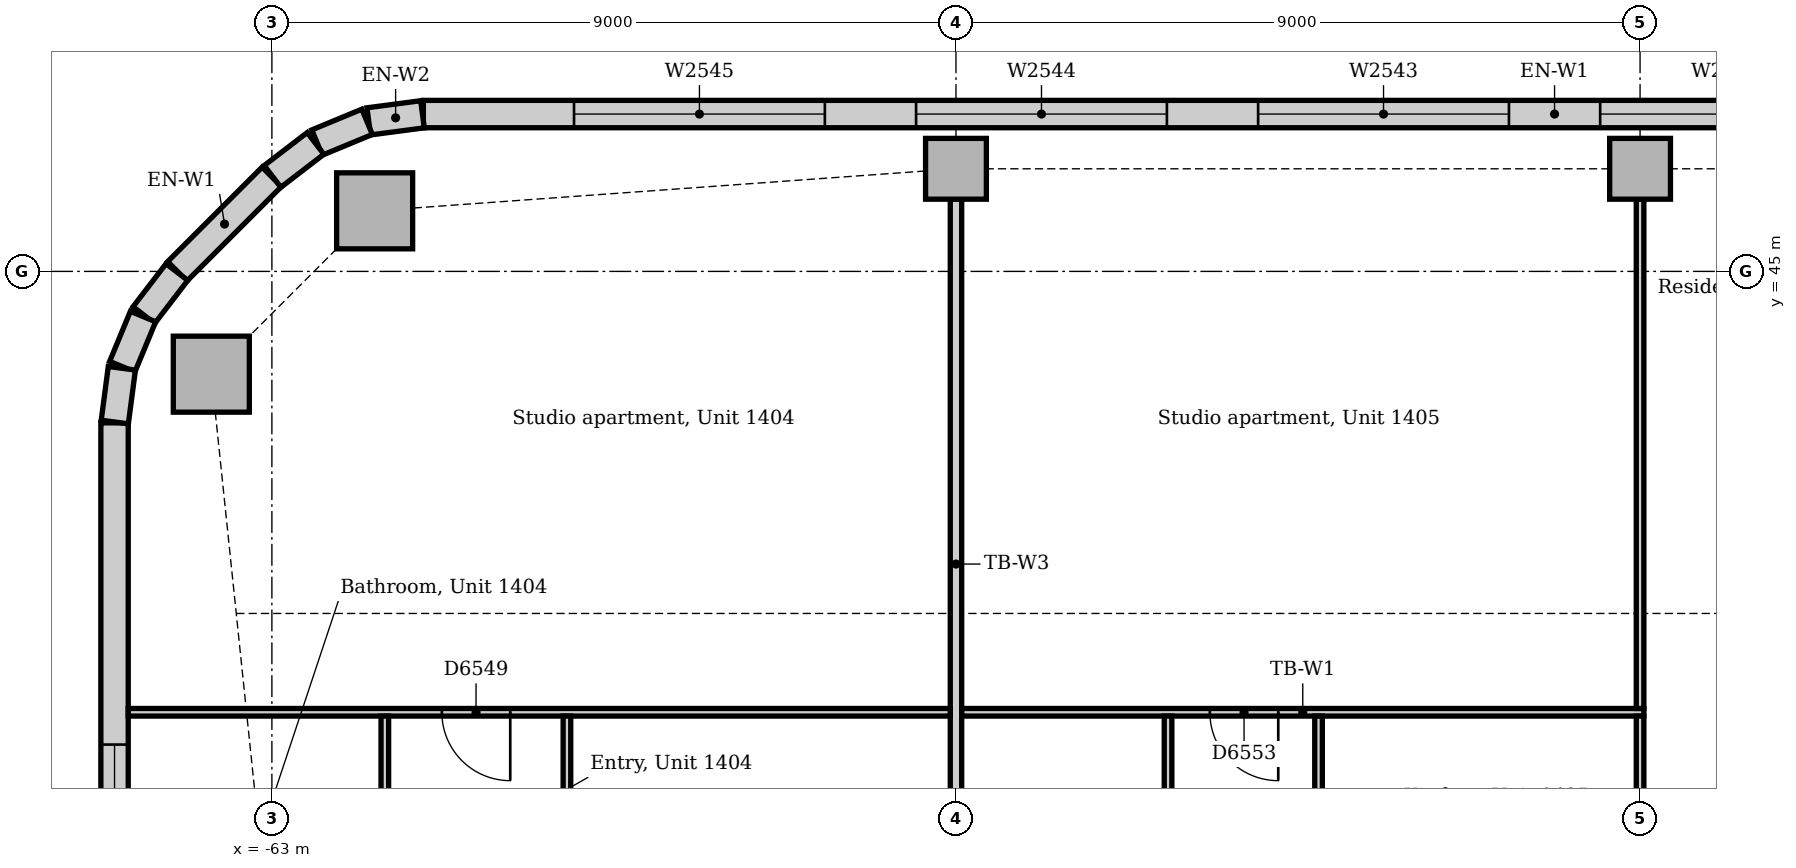
"""IFC4 building model, lengths in metres.
Left out: names, types, materials, properties, quantities, classifications, styles, units other than length and angle.
Written with IfcOpenShell. Run it as: python <this file> out.ifc"""

import sys

from ifc_helpers import new_model, si_unit, direction, frame, frame_2d, origin, origin_2d, place, context, subcontext, project, spatial, rectangle, extrude, element, fill, save


model = new_model("IFC4")
c1 = context("Model", 3, precision=1e-05, world=origin(), true_north=direction((0.0, 1.0)))
c2 = subcontext(c1, "Body", "Model", "MODEL_VIEW")
j1 = project(units=[si_unit("LENGTHUNIT", "METRE"), si_unit("PLANEANGLEUNIT", "RADIAN")], contexts=[c1])
p1 = place(None, origin())
s1 = spatial("IfcSite", under=j1, at=p1, CompositionType="ELEMENT")
p2 = place(p1, origin())
s2 = spatial("IfcBuilding", under=s1, at=p2, CompositionType="ELEMENT")
p3 = place(p2, frame((0.0, 0.0, 63.0)))
s3 = spatial("IfcBuildingStorey", under=s2, at=p3, CompositionType="ELEMENT", Elevation=63.0)
for number, where, z_axis, x_axis in (
    (1, (-61.648, 45.797, 0.0), (0.0, 0.0, 1.0), (1.0, 0.0, 0.0)),
    (2, (-63.797, 43.648, 0.0), (0.0, 0.0, 1.0), (1.0, 0.0, 0.0)),
):
    element("IfcColumn", number, at=place(p3, frame(where, z_axis=z_axis, x_axis=x_axis)), inside=s3, PredefinedType="COLUMN", context=c2, shape_type="SweptSolid", body=[
        extrude(rectangle(XDim=1.0, YDim=1.0, at=origin_2d()), origin(), (0.0, 0.0, 1.0), 3.85),
    ])
for number, where, z_axis, x_axis in (
    (3, (-54.0, 46.35, 0.0), (0.0, 0.0, 1.0), (1.0, 0.0, 0.0)),
    (4, (-45.0, 46.35, 0.0), (0.0, 0.0, 1.0), (1.0, 0.0, 0.0)),
):
    element("IfcColumn", number, at=place(p3, frame(where, z_axis=z_axis, x_axis=x_axis)), inside=s3, PredefinedType="COLUMN", context=c2, shape_type="SweptSolid", body=[
        extrude(rectangle(XDim=0.8, YDim=0.8, at=origin_2d()), origin(), (0.0, 0.0, 1.0), 3.85),
    ])
p4 = place(p3, frame((-31.243, 47.07, 0.0), z_axis=(0.0, 0.0, 1.0), x_axis=(-1.0, 0.0, 0.0)))
e5 = element("IfcWall", 5, at=p4, inside=s3, PredefinedType="STANDARD", context=c2, shape_type="SweptSolid", body=[
    extrude(rectangle(XDim=29.765, YDim=0.36, at=frame_2d((14.882, 0.0))), origin(), (0.0, 0.0, 1.0), 3.85),
])
p5 = place(p4, frame((1.982, 0.0, 0.9)))
e6 = element("IfcOpeningElement", 6, at=p5, cuts=e5, PredefinedType="OPENING", context=c2, shape_type="SweptSolid", body=[
    extrude(rectangle(XDim=3.3, YDim=1.6, at=frame_2d((1.65, 0.8))), frame((0.0, 0.19, 0.0), z_axis=(0.0, -1.0, 0.0), x_axis=(1.0, 0.0, 0.0)), (0.0, 0.0, 1.0), 0.38),
])
p6 = place(p4, frame((6.482, 0.0, 0.9)))
e7 = element("IfcOpeningElement", 7, at=p6, cuts=e5, PredefinedType="OPENING", context=c2, shape_type="SweptSolid", body=[
    extrude(rectangle(XDim=3.3, YDim=1.6, at=frame_2d((1.65, 0.8))), frame((0.0, 0.19, 0.0), z_axis=(0.0, -1.0, 0.0), x_axis=(1.0, 0.0, 0.0)), (0.0, 0.0, 1.0), 0.38),
])
p7 = place(p4, frame((10.982, 0.0, 0.9)))
e8 = element("IfcOpeningElement", 8, at=p7, cuts=e5, PredefinedType="OPENING", context=c2, shape_type="SweptSolid", body=[
    extrude(rectangle(XDim=3.3, YDim=1.6, at=frame_2d((1.65, 0.8))), frame((0.0, 0.19, 0.0), z_axis=(0.0, -1.0, 0.0), x_axis=(1.0, 0.0, 0.0)), (0.0, 0.0, 1.0), 0.38),
])
p8 = place(p4, frame((15.482, 0.0, 0.9)))
e9 = element("IfcOpeningElement", 9, at=p8, cuts=e5, PredefinedType="OPENING", context=c2, shape_type="SweptSolid", body=[
    extrude(rectangle(XDim=3.3, YDim=1.6, at=frame_2d((1.65, 0.8))), frame((0.0, 0.19, 0.0), z_axis=(0.0, -1.0, 0.0), x_axis=(1.0, 0.0, 0.0)), (0.0, 0.0, 1.0), 0.38),
])
p9 = place(p4, frame((19.982, 0.0, 0.9)))
e10 = element("IfcOpeningElement", 10, at=p9, cuts=e5, PredefinedType="OPENING", context=c2, shape_type="SweptSolid", body=[
    extrude(rectangle(XDim=3.3, YDim=1.6, at=frame_2d((1.65, 0.8))), frame((0.0, 0.19, 0.0), z_axis=(0.0, -1.0, 0.0), x_axis=(1.0, 0.0, 0.0)), (0.0, 0.0, 1.0), 0.38),
])
p10 = place(p4, frame((24.482, 0.0, 0.9)))
e11 = element("IfcOpeningElement", 11, at=p10, cuts=e5, PredefinedType="OPENING", context=c2, shape_type="SweptSolid", body=[
    extrude(rectangle(XDim=3.3, YDim=1.6, at=frame_2d((1.65, 0.8))), frame((0.0, 0.19, 0.0), z_axis=(0.0, -1.0, 0.0), x_axis=(1.0, 0.0, 0.0)), (0.0, 0.0, 1.0), 0.38),
])
p11 = place(p3, frame((-63.001, 46.244, 0.0), z_axis=(0.0, 0.0, 1.0), x_axis=(-0.707106781187, -0.707106781187, 0.0)))
e12 = element("IfcWall", 12, at=p11, inside=s3, PredefinedType="STANDARD", context=c2, shape_type="SweptSolid", body=[
    extrude(rectangle(XDim=1.757, YDim=0.36, at=frame_2d((0.879, 0.0))), origin(), (0.0, 0.0, 1.0), 3.85),
])
p12 = place(p3, frame((-65.07, 43.007, 0.0), z_axis=(0.0, 0.0, 1.0), x_axis=(0.0, -1.0, 0.0)))
e13 = element("IfcWall", 13, at=p12, inside=s3, PredefinedType="STANDARD", context=c2, shape_type="SweptSolid", body=[
    extrude(rectangle(XDim=23.765, YDim=0.36, at=frame_2d((11.882, 0.0))), origin(), (0.0, 0.0, 1.0), 3.85),
])
p13 = place(p12, frame((4.232, 0.0, 0.9)))
e14 = element("IfcOpeningElement", 14, at=p13, cuts=e13, PredefinedType="OPENING", context=c2, shape_type="SweptSolid", body=[
    extrude(rectangle(XDim=1.8, YDim=1.6, at=frame_2d((0.9, 0.8))), frame((0.0, 0.19, 0.0), z_axis=(0.0, -1.0, 0.0), x_axis=(1.0, 0.0, 0.0)), (0.0, 0.0, 1.0), 0.38),
])
p14 = place(p12, frame((9.332, 0.0, 0.9)))
e15 = element("IfcOpeningElement", 15, at=p14, cuts=e13, PredefinedType="OPENING", context=c2, shape_type="SweptSolid", body=[
    extrude(rectangle(XDim=1.8, YDim=1.6, at=frame_2d((0.9, 0.8))), frame((0.0, 0.19, 0.0), z_axis=(0.0, -1.0, 0.0), x_axis=(1.0, 0.0, 0.0)), (0.0, 0.0, 1.0), 0.38),
])
p15 = place(p12, frame((12.482, 0.0, 0.9)))
e16 = element("IfcOpeningElement", 16, at=p15, cuts=e13, PredefinedType="OPENING", context=c2, shape_type="SweptSolid", body=[
    extrude(rectangle(XDim=3.3, YDim=1.6, at=frame_2d((1.65, 0.8))), frame((0.0, 0.19, 0.0), z_axis=(0.0, -1.0, 0.0), x_axis=(1.0, 0.0, 0.0)), (0.0, 0.0, 1.0), 0.38),
])
p16 = place(p12, frame((16.982, 0.0, 0.9)))
e17 = element("IfcOpeningElement", 17, at=p16, cuts=e13, PredefinedType="OPENING", context=c2, shape_type="SweptSolid", body=[
    extrude(rectangle(XDim=3.3, YDim=1.6, at=frame_2d((1.65, 0.8))), frame((0.0, 0.19, 0.0), z_axis=(0.0, -1.0, 0.0), x_axis=(1.0, 0.0, 0.0)), (0.0, 0.0, 1.0), 0.38),
])
for number, where, z_axis, x_axis in (
    (18, (-61.019, 47.067, 0.0), (0.0, 0.0, 1.0), (-0.991, -0.131, 0.0)),
    (19, (-61.747, 46.968, 0.0), (0.0, 0.0, 1.0), (-0.924, -0.383, 0.0)),
):
    element("IfcWall", number, at=place(p3, frame(where, z_axis=z_axis, x_axis=x_axis)), inside=s3, PredefinedType="STANDARD", context=c2, shape_type="SweptSolid", body=[
        extrude(rectangle(XDim=0.713, YDim=0.36, at=frame_2d((0.356, 0.0))), origin(), (0.0, 0.0, 1.0), 3.85),
    ])
for number, where, z_axis, x_axis in (
    (20, (-62.425, 46.684, 0.0), (0.0, 0.0, 1.0), (-0.793, -0.609, 0.0)),
    (21, (-64.25, 44.991, 0.0), (0.0, 0.0, 1.0), (-0.609, -0.793, 0.0)),
):
    element("IfcWall", number, at=place(p3, frame(where, z_axis=z_axis, x_axis=x_axis)), inside=s3, PredefinedType="STANDARD", context=c2, shape_type="SweptSolid", body=[
        extrude(rectangle(XDim=0.713, YDim=0.36, at=frame_2d((0.357, 0.0))), origin(), (0.0, 0.0, 1.0), 3.85),
    ])
for number, where, z_axis, x_axis in (
    (22, (-64.695, 44.406, 0.0), (0.0, 0.0, 1.0), (-0.383, -0.924, 0.0)),
    (23, (-64.974, 43.726, 0.0), (0.0, 0.0, 1.0), (-0.131, -0.991, 0.0)),
):
    element("IfcWall", number, at=place(p3, frame(where, z_axis=z_axis, x_axis=x_axis)), inside=s3, PredefinedType="STANDARD", context=c2, shape_type="SweptSolid", body=[
        extrude(rectangle(XDim=0.713, YDim=0.36, at=frame_2d((0.356, 0.0))), origin(), (0.0, 0.0, 1.0), 3.85),
    ])
p17 = place(p3, frame((-54.0, 36.35, 0.0), z_axis=(0.0, 0.0, 1.0), x_axis=(0.0, 1.0, 0.0)))
e24 = element("IfcWall", 24, at=p17, inside=s3, PredefinedType="PARTITIONING", context=c2, shape_type="SweptSolid", body=[
    extrude(rectangle(XDim=9.6, YDim=0.15, at=frame_2d((4.8, 0.0))), origin(), (0.0, 0.0, 1.0), 3.256),
])
p18 = place(p3, frame((-53.925, 39.2, 0.0), z_axis=(0.0, 0.0, 1.0), x_axis=(1.0, 0.0, 0.0)))
e25 = element("IfcWall", 25, at=p18, inside=s3, PredefinedType="PARTITIONING", context=c2, shape_type="SweptSolid", body=[
    extrude(rectangle(XDim=8.975, YDim=0.1, at=frame_2d((4.487, 0.0))), origin(), (0.0, 0.0, 1.0), 3.85),
])
p19 = place(p18, frame((3.265, 0.0, 0.0)))
e26 = element("IfcOpeningElement", 26, at=p19, cuts=e25, PredefinedType="OPENING", context=c2, shape_type="SweptSolid", body=[
    extrude(rectangle(XDim=0.9, YDim=2.1, at=frame_2d((0.45, 1.05))), frame((0.0, 0.06, 0.0), z_axis=(0.0, -1.0, 0.0), x_axis=(1.0, 0.0, 0.0)), (0.0, 0.0, 1.0), 0.12),
])
p20 = place(p3, frame((-64.89, 39.2, 0.0), z_axis=(0.0, 0.0, 1.0), x_axis=(1.0, 0.0, 0.0)))
e27 = element("IfcWall", 27, at=p20, inside=s3, PredefinedType="PARTITIONING", context=c2, shape_type="SweptSolid", body=[
    extrude(rectangle(XDim=10.815, YDim=0.1, at=frame_2d((5.407, 0.0))), origin(), (0.0, 0.0, 1.0), 3.85),
])
p21 = place(p20, frame((4.126, 0.0, 0.0)))
e28 = element("IfcOpeningElement", 28, at=p21, cuts=e27, PredefinedType="OPENING", context=c2, shape_type="SweptSolid", body=[
    extrude(rectangle(XDim=0.9, YDim=2.1, at=frame_2d((0.45, 1.05))), frame((0.0, 0.06, 0.0), z_axis=(0.0, -1.0, 0.0), x_axis=(1.0, 0.0, 0.0)), (0.0, 0.0, 1.0), 0.12),
])
p22 = place(p3, frame((-45.0, 39.25, 0.0), z_axis=(0.0, 0.0, 1.0), x_axis=(0.0, 1.0, 0.0)))
e29 = element("IfcWall", 29, at=p22, inside=s3, PredefinedType="PARTITIONING", context=c2, shape_type="SweptSolid", body=[
    extrude(rectangle(XDim=6.7, YDim=0.1, at=frame_2d((3.35, 0.0))), origin(), (0.0, 0.0, 1.0), 3.256),
])
p23 = place(p3, frame((-45.0, 36.35, 0.0), z_axis=(0.0, 0.0, 1.0), x_axis=(0.0, 1.0, 0.0)))
e30 = element("IfcWall", 30, at=p23, inside=s3, PredefinedType="PARTITIONING", context=c2, shape_type="SweptSolid", body=[
    extrude(rectangle(XDim=2.8, YDim=0.1, at=frame_2d((1.4, 0.0))), origin(), (0.0, 0.0, 1.0), 3.256),
])
p24 = place(p3, frame((-61.514, 36.075, 0.0), z_axis=(0.0, 0.0, 1.0), x_axis=(0.0, 1.0, 0.0)))
e31 = element("IfcWall", 31, at=p24, inside=s3, PredefinedType="PARTITIONING", context=c2, shape_type="SweptSolid", body=[
    extrude(rectangle(XDim=3.075, YDim=0.1, at=frame_2d((1.538, 0.0))), origin(), (0.0, 0.0, 1.0), 3.85),
])
p25 = place(p24, frame((1.1, 0.0, 0.0)))
e32 = element("IfcOpeningElement", 32, at=p25, cuts=e31, PredefinedType="OPENING", context=c2, shape_type="SweptSolid", body=[
    extrude(rectangle(XDim=0.9, YDim=2.1, at=frame_2d((0.45, 1.05))), frame((0.0, 0.06, 0.0), z_axis=(0.0, -1.0, 0.0), x_axis=(1.0, 0.0, 0.0)), (0.0, 0.0, 1.0), 0.12),
])
p26 = place(p3, frame((-59.118, 36.075, 0.0), z_axis=(0.0, 0.0, 1.0), x_axis=(0.0, 1.0, 0.0)))
e33 = element("IfcWall", 33, at=p26, inside=s3, PredefinedType="PARTITIONING", context=c2, shape_type="SweptSolid", body=[
    extrude(rectangle(XDim=3.075, YDim=0.1, at=frame_2d((1.538, 0.0))), origin(), (0.0, 0.0, 1.0), 3.85),
])
p27 = place(p26, frame((1.1, 0.0, 0.0)))
e34 = element("IfcOpeningElement", 34, at=p27, cuts=e33, PredefinedType="OPENING", context=c2, shape_type="SweptSolid", body=[
    extrude(rectangle(XDim=0.9, YDim=2.1, at=frame_2d((0.45, 1.05))), frame((0.0, 0.06, 0.0), z_axis=(0.0, -1.0, 0.0), x_axis=(1.0, 0.0, 0.0)), (0.0, 0.0, 1.0), 0.12),
])
p28 = place(p3, frame((-51.21, 36.075, 0.0), z_axis=(0.0, 0.0, 1.0), x_axis=(0.0, 1.0, 0.0)))
e35 = element("IfcWall", 35, at=p28, inside=s3, PredefinedType="PARTITIONING", context=c2, shape_type="SweptSolid", body=[
    extrude(rectangle(XDim=3.075, YDim=0.1, at=frame_2d((1.538, 0.0))), origin(), (0.0, 0.0, 1.0), 3.85),
])
p29 = place(p28, frame((1.1, 0.0, 0.0)))
e36 = element("IfcOpeningElement", 36, at=p29, cuts=e35, PredefinedType="OPENING", context=c2, shape_type="SweptSolid", body=[
    extrude(rectangle(XDim=0.9, YDim=2.1, at=frame_2d((0.45, 1.05))), frame((0.0, 0.06, 0.0), z_axis=(0.0, -1.0, 0.0), x_axis=(1.0, 0.0, 0.0)), (0.0, 0.0, 1.0), 0.12),
])
p30 = place(p3, frame((-49.23, 36.075, 0.0), z_axis=(0.0, 0.0, 1.0), x_axis=(0.0, 1.0, 0.0)))
e37 = element("IfcWall", 37, at=p30, inside=s3, PredefinedType="PARTITIONING", context=c2, shape_type="SweptSolid", body=[
    extrude(rectangle(XDim=3.075, YDim=0.1, at=frame_2d((1.538, 0.0))), origin(), (0.0, 0.0, 1.0), 3.85),
])
p31 = place(p30, frame((1.1, 0.0, 0.0)))
e38 = element("IfcOpeningElement", 38, at=p31, cuts=e37, PredefinedType="OPENING", context=c2, shape_type="SweptSolid", body=[
    extrude(rectangle(XDim=0.9, YDim=2.1, at=frame_2d((0.45, 1.05))), frame((0.0, 0.06, 0.0), z_axis=(0.0, -1.0, 0.0), x_axis=(1.0, 0.0, 0.0)), (0.0, 0.0, 1.0), 0.12),
])
p32 = place(p7, origin())
e39 = element("IfcWindow", 39, at=p32, inside=s3, PartitioningType="SINGLE_PANEL", PredefinedType="WINDOW", context=c2, shape_type="SweptSolid", body=[
    extrude(rectangle(XDim=3.3, YDim=1.6, at=frame_2d((1.65, 0.8))), frame((0.0, 0.13, 0.0), z_axis=(0.0, -1.0, 0.0), x_axis=(1.0, 0.0, 0.0)), (0.0, 0.0, 1.0), 0.06),
])
fill(e8, e39)
p33 = place(p8, origin())
e40 = element("IfcWindow", 40, at=p33, inside=s3, PartitioningType="SINGLE_PANEL", PredefinedType="WINDOW", context=c2, shape_type="SweptSolid", body=[
    extrude(rectangle(XDim=3.3, YDim=1.6, at=frame_2d((1.65, 0.8))), frame((0.0, 0.13, 0.0), z_axis=(0.0, -1.0, 0.0), x_axis=(1.0, 0.0, 0.0)), (0.0, 0.0, 1.0), 0.06),
])
fill(e9, e40)
p34 = place(p9, origin())
e41 = element("IfcWindow", 41, at=p34, inside=s3, PartitioningType="SINGLE_PANEL", PredefinedType="WINDOW", context=c2, shape_type="SweptSolid", body=[
    extrude(rectangle(XDim=3.3, YDim=1.6, at=frame_2d((1.65, 0.8))), frame((0.0, 0.13, 0.0), z_axis=(0.0, -1.0, 0.0), x_axis=(1.0, 0.0, 0.0)), (0.0, 0.0, 1.0), 0.06),
])
fill(e10, e41)
p35 = place(p10, origin())
e42 = element("IfcWindow", 42, at=p35, inside=s3, PartitioningType="SINGLE_PANEL", PredefinedType="WINDOW", context=c2, shape_type="SweptSolid", body=[
    extrude(rectangle(XDim=3.3, YDim=1.6, at=frame_2d((1.65, 0.8))), frame((0.0, 0.13, 0.0), z_axis=(0.0, -1.0, 0.0), x_axis=(1.0, 0.0, 0.0)), (0.0, 0.0, 1.0), 0.06),
])
fill(e11, e42)
p36 = place(p13, origin())
e43 = element("IfcWindow", 43, at=p36, inside=s3, PartitioningType="SINGLE_PANEL", PredefinedType="WINDOW", context=c2, shape_type="SweptSolid", body=[
    extrude(rectangle(XDim=1.8, YDim=1.6, at=frame_2d((0.9, 0.8))), frame((0.0, 0.13, 0.0), z_axis=(0.0, -1.0, 0.0), x_axis=(1.0, 0.0, 0.0)), (0.0, 0.0, 1.0), 0.06),
])
fill(e14, e43)
p37 = place(p21, frame((0.9, 0.0, 0.0), z_axis=(0.0, 0.0, 1.0), x_axis=(-1.0, 0.0, 0.0)))
e44 = element("IfcDoor", 44, at=p37, inside=s3, OperationType="SINGLE_SWING_LEFT", PredefinedType="DOOR", context=c2, shape_type="SweptSolid", body=[
    extrude(rectangle(XDim=0.9, YDim=2.1, at=frame_2d((0.45, 1.05))), frame((0.0, 0.025, 0.0), z_axis=(0.0, -1.0, 0.0), x_axis=(1.0, 0.0, 0.0)), (0.0, 0.0, 1.0), 0.05),
])
fill(e28, e44)
p38 = place(p19, frame((0.9, 0.0, 0.0), z_axis=(0.0, 0.0, 1.0), x_axis=(-1.0, 0.0, 0.0)))
e45 = element("IfcDoor", 45, at=p38, inside=s3, OperationType="SINGLE_SWING_LEFT", PredefinedType="DOOR", context=c2, shape_type="SweptSolid", body=[
    extrude(rectangle(XDim=0.9, YDim=2.1, at=frame_2d((0.45, 1.05))), frame((0.0, 0.025, 0.0), z_axis=(0.0, -1.0, 0.0), x_axis=(1.0, 0.0, 0.0)), (0.0, 0.0, 1.0), 0.05),
])
fill(e26, e45)
save(model, sys.argv[1])
